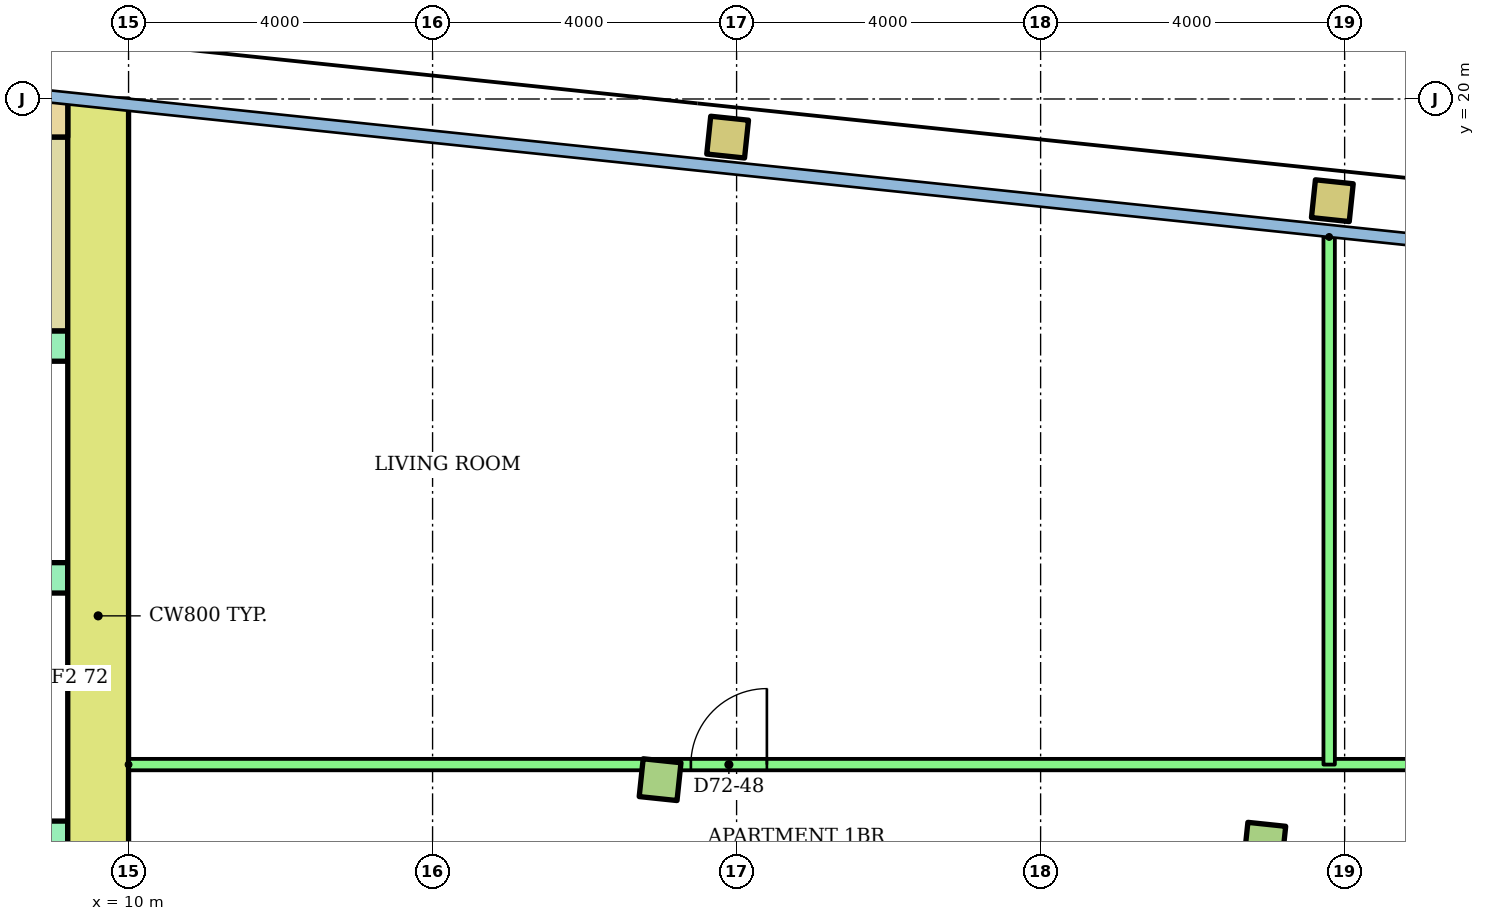
"""IFC4 building model, lengths in metres.
Left out: names, types, materials, properties, quantities, classifications, styles, units other than length and angle.
Written with IfcOpenShell. Run it as: python <this file> out.ifc"""

import sys

from ifc_helpers import new_model, si_unit, direction, frame, frame_2d, origin, origin_2d, place, context, subcontext, project, spatial, rectangle, hollow_rectangle, extrude, element, fill, save


model = new_model("IFC4")
c1 = context("Model", 3, precision=1e-05, world=origin(), true_north=direction((0.0, 1.0)))
c2 = subcontext(c1, "Body", "Model", "MODEL_VIEW")
j1 = project(units=[si_unit("LENGTHUNIT", "METRE"), si_unit("PLANEANGLEUNIT", "RADIAN")], contexts=[c1])
p1 = place(None, origin())
s1 = spatial("IfcSite", under=j1, at=p1, CompositionType="ELEMENT")
p2 = place(p1, origin())
s2 = spatial("IfcBuilding", under=s1, at=p2, CompositionType="ELEMENT")
p3 = place(p2, frame((0.0, 0.0, 275.5)))
s3 = spatial("IfcBuildingStorey", under=s2, at=p3, CompositionType="ELEMENT", Elevation=275.5)
for number, where, z_axis, x_axis in (
    (1, (16.993, 11.045, 0.0), (0.0, 0.0, 1.0), (0.995, -0.105, 0.0)),
    (2, (24.95, 10.209, 0.0), (0.0, 0.0, 1.0), (0.995, -0.105, 0.0)),
):
    element("IfcColumn", number, at=place(p3, frame(where, z_axis=z_axis, x_axis=x_axis)), inside=s3, PredefinedType="COLUMN", context=c2, shape_type="SweptSolid", body=[
        extrude(rectangle(XDim=0.5, YDim=0.5, at=origin_2d()), origin(), (0.0, 0.0, 1.0), 3.2),
    ])
for number, where, z_axis, x_axis in (
    (3, (17.882, 19.498, 0.0), (0.0, 0.0, 1.0), (0.995, -0.105, 0.0)),
    (4, (25.838, 18.662, 0.0), (0.0, 0.0, 1.0), (0.995, -0.105, 0.0)),
):
    element("IfcColumn", number, at=place(p3, frame(where, z_axis=z_axis, x_axis=x_axis)), inside=s3, PredefinedType="COLUMN", context=c2, shape_type="SweptSolid", body=[
        extrude(hollow_rectangle(XDim=0.5, YDim=0.5, WallThickness=0.025, at=origin_2d()), origin(), (0.0, 0.0, 1.0), 3.2),
    ])
p4 = place(p3, frame((9.6, 6.4, 0.0), z_axis=(0.0, 0.0, 1.0), x_axis=(0.0, 1.0, 0.0)))
e5 = element("IfcWall", 5, at=p4, inside=s3, PredefinedType="SHEAR", context=c2, shape_type="SweptSolid", body=[
    extrude(rectangle(XDim=13.6, YDim=0.8, at=frame_2d((6.8, 0.0))), origin(), (0.0, 0.0, 1.0), 2.92),
])
p5 = place(p3, frame((-9.2, 19.75, 0.0)))
e6 = element("IfcWall", 6, at=p5, inside=s3, PredefinedType="SHEAR", context=c2, shape_type="SweptSolid", body=[
    extrude(rectangle(XDim=18.4, YDim=0.5, at=frame_2d((9.2, 0.0))), origin(), (0.0, 0.0, 1.0), 2.92),
])
p6 = place(p3, frame((1.2, 10.3, 0.0)))
e7 = element("IfcWall", 7, at=p6, inside=s3, PredefinedType="SHEAR", context=c2, shape_type="SweptSolid", body=[
    extrude(rectangle(XDim=8.0, YDim=0.4, at=frame_2d((4.0, 0.0))), origin(), (0.0, 0.0, 1.0), 2.92),
])
p7 = place(p6, frame((0.817, 0.0, 0.0)))
e8 = element("IfcOpeningElement", 8, at=p7, cuts=e7, PredefinedType="OPENING", context=c2, shape_type="SweptSolid", body=[
    extrude(rectangle(XDim=1.1, YDim=2.1, at=frame_2d((0.55, 1.05))), frame((0.0, 0.21, 0.0), z_axis=(0.0, -1.0, 0.0), x_axis=(1.0, 0.0, 0.0)), (0.0, 0.0, 1.0), 0.42),
])
p8 = place(p6, frame((3.55, 0.0, 0.0)))
e9 = element("IfcOpeningElement", 9, at=p8, cuts=e7, PredefinedType="OPENING", context=c2, shape_type="SweptSolid", body=[
    extrude(rectangle(XDim=1.1, YDim=2.1, at=frame_2d((0.55, 1.05))), frame((0.0, 0.21, 0.0), z_axis=(0.0, -1.0, 0.0), x_axis=(1.0, 0.0, 0.0)), (0.0, 0.0, 1.0), 0.42),
])
p9 = place(p6, frame((6.283, 0.0, 0.0)))
e10 = element("IfcOpeningElement", 10, at=p9, cuts=e7, PredefinedType="OPENING", context=c2, shape_type="SweptSolid", body=[
    extrude(rectangle(XDim=1.1, YDim=2.1, at=frame_2d((0.55, 1.05))), frame((0.0, 0.21, 0.0), z_axis=(0.0, -1.0, 0.0), x_axis=(1.0, 0.0, 0.0)), (0.0, 0.0, 1.0), 0.42),
])
p10 = place(p3, frame((1.2, 13.7, 0.0)))
e11 = element("IfcWall", 11, at=p10, inside=s3, PredefinedType="SHEAR", context=c2, shape_type="SweptSolid", body=[
    extrude(rectangle(XDim=8.0, YDim=0.4, at=frame_2d((4.0, 0.0))), origin(), (0.0, 0.0, 1.0), 2.92),
])
p11 = place(p3, frame((-9.2, 16.75, 0.0)))
e12 = element("IfcWall", 12, at=p11, inside=s3, PredefinedType="SHEAR", context=c2, shape_type="SweptSolid", body=[
    extrude(rectangle(XDim=18.4, YDim=0.4, at=frame_2d((9.2, 0.0))), origin(), (0.0, 0.0, 1.0), 2.92),
])
p12 = place(p11, frame((0.1, 0.0, 0.0)))
e13 = element("IfcOpeningElement", 13, at=p12, cuts=e12, PredefinedType="OPENING", context=c2, shape_type="SweptSolid", body=[
    extrude(rectangle(XDim=0.95, YDim=2.1, at=frame_2d((0.475, 1.05))), frame((0.0, 0.21, 0.0), z_axis=(0.0, -1.0, 0.0), x_axis=(1.0, 0.0, 0.0)), (0.0, 0.0, 1.0), 0.42),
])
p13 = place(p11, frame((6.1, 0.0, 0.0)))
e14 = element("IfcOpeningElement", 14, at=p13, cuts=e12, PredefinedType="OPENING", context=c2, shape_type="SweptSolid", body=[
    extrude(rectangle(XDim=0.95, YDim=2.1, at=frame_2d((0.475, 1.05))), frame((0.0, 0.21, 0.0), z_axis=(0.0, -1.0, 0.0), x_axis=(1.0, 0.0, 0.0)), (0.0, 0.0, 1.0), 0.42),
])
p14 = place(p11, frame((12.1, 0.0, 0.0)))
e15 = element("IfcOpeningElement", 15, at=p14, cuts=e12, PredefinedType="OPENING", context=c2, shape_type="SweptSolid", body=[
    extrude(rectangle(XDim=0.95, YDim=2.1, at=frame_2d((0.475, 1.05))), frame((0.0, 0.21, 0.0), z_axis=(0.0, -1.0, 0.0), x_axis=(1.0, 0.0, 0.0)), (0.0, 0.0, 1.0), 0.42),
])
p15 = place(p3, frame((8.75, 16.95, 0.0), z_axis=(0.0, 0.0, 1.0), x_axis=(0.0, 1.0, 0.0)))
e16 = element("IfcWall", 16, at=p15, inside=s3, PredefinedType="SHEAR", context=c2, shape_type="SweptSolid", body=[
    extrude(rectangle(XDim=2.55, YDim=0.9, at=frame_2d((1.275, 0.0))), origin(), (0.0, 0.0, 1.0), 2.92),
])
p16 = place(p3, frame((10.0, 11.243, 0.0)))
e17 = element("IfcWall", 17, at=p16, inside=s3, PredefinedType="PARTITIONING", context=c2, shape_type="SweptSolid", body=[
    extrude(rectangle(XDim=22.118, YDim=0.15, at=frame_2d((11.059, 0.0))), origin(), (0.0, 0.0, 1.0), 2.4),
])
p17 = place(p16, frame((7.398, 0.0, 0.0)))
e18 = element("IfcOpeningElement", 18, at=p17, cuts=e17, PredefinedType="OPENING", context=c2, shape_type="SweptSolid", body=[
    extrude(rectangle(XDim=1.0, YDim=2.1, at=frame_2d((0.5, 1.05))), frame((0.0, 0.085, 0.0), z_axis=(0.0, -1.0, 0.0), x_axis=(1.0, 0.0, 0.0)), (0.0, 0.0, 1.0), 0.17),
])
p18 = place(p16, frame((18.477, 0.0, 0.0)))
e19 = element("IfcOpeningElement", 19, at=p18, cuts=e17, PredefinedType="OPENING", context=c2, shape_type="SweptSolid", body=[
    extrude(rectangle(XDim=0.9, YDim=2.1, at=frame_2d((0.45, 1.05))), frame((0.0, 0.085, 0.0), z_axis=(0.0, -1.0, 0.0), x_axis=(1.0, 0.0, 0.0)), (0.0, 0.0, 1.0), 0.17),
])
p19 = place(p3, frame((25.796, 18.185, 0.0), z_axis=(0.0, 0.0, 1.0), x_axis=(0.0, -1.0, 0.0)))
e20 = element("IfcWall", 20, at=p19, inside=s3, PredefinedType="PARTITIONING", context=c2, shape_type="SweptSolid", body=[
    extrude(rectangle(XDim=6.941, YDim=0.15, at=frame_2d((3.471, 0.0))), origin(), (0.0, 0.0, 1.0), 2.4),
])
p20 = place(p17, origin())
e21 = element("IfcDoor", 21, at=p20, inside=s3, OperationType="SINGLE_SWING_RIGHT", PredefinedType="DOOR", context=c2, shape_type="SweptSolid", body=[
    extrude(rectangle(XDim=1.0, YDim=2.1, at=frame_2d((0.5, 1.05))), frame((0.0, 0.025, 0.0), z_axis=(0.0, -1.0, 0.0), x_axis=(1.0, 0.0, 0.0)), (0.0, 0.0, 1.0), 0.05),
])
fill(e18, e21)
save(model, sys.argv[1])
